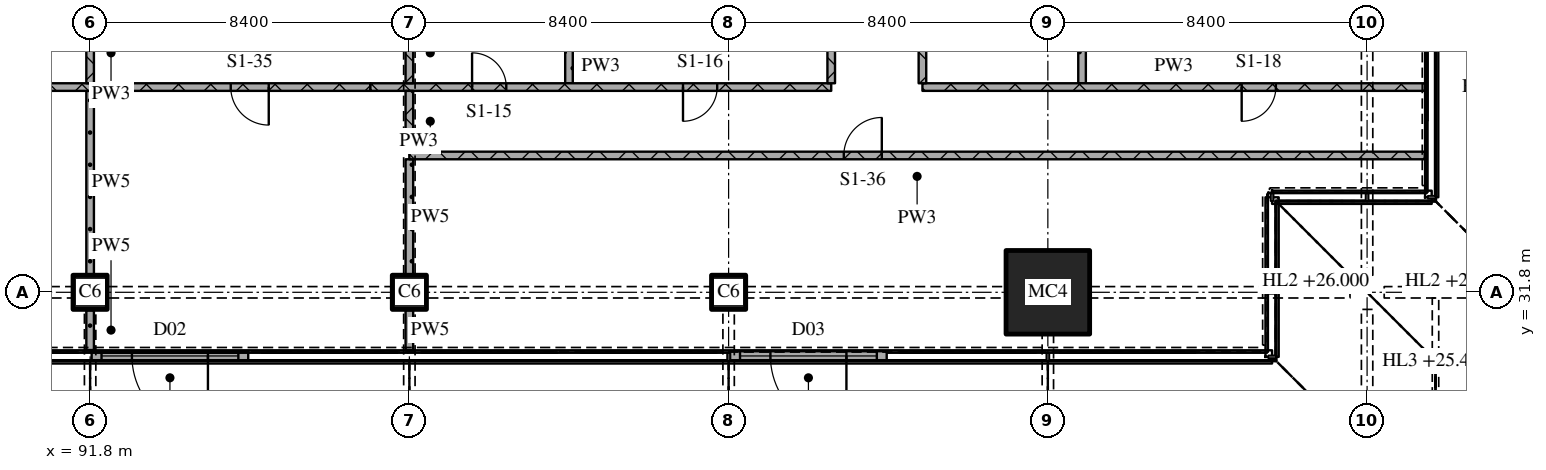
"""IFC4 building model, lengths in metres.
Left out: names, types, materials, properties, quantities, classifications, styles, units other than length and angle.
Written with IfcOpenShell. Run it as: python <this file> out.ifc"""

import sys

from ifc_helpers import new_model, si_unit, direction, frame, frame_2d, origin, origin_2d, place, context, subcontext, project, spatial, rectangle, extrude, element, fill, save


model = new_model("IFC4")
c1 = context("Model", 3, precision=1e-05, world=origin(), true_north=direction((0.0, 1.0)))
c2 = subcontext(c1, "Body", "Model", "MODEL_VIEW")
j1 = project(units=[si_unit("LENGTHUNIT", "METRE"), si_unit("PLANEANGLEUNIT", "RADIAN")], contexts=[c1])
p1 = place(None, origin())
s1 = spatial("IfcSite", under=j1, at=p1, CompositionType="ELEMENT")
p2 = place(p1, origin())
s2 = spatial("IfcBuilding", under=s1, at=p2, CompositionType="ELEMENT")
p3 = place(p2, frame((0.0, 0.0, 19.2)))
s3 = spatial("IfcBuildingStorey", under=s2, at=p3, CompositionType="ELEMENT", Elevation=19.2)
for number, where, z_axis, x_axis in (
    (1, (91.8, 31.8, 0.0), (0.0, 0.0, 1.0), (1.0, 0.0, 0.0)),
    (2, (100.2, 31.8, 0.0), (0.0, 0.0, 1.0), (1.0, 0.0, 0.0)),
    (3, (108.6, 31.8, 0.0), (0.0, 0.0, 1.0), (1.0, 0.0, 0.0)),
):
    element("IfcColumn", number, at=place(p3, frame(where, z_axis=z_axis, x_axis=x_axis)), inside=s3, PredefinedType="COLUMN", context=c2, shape_type="SweptSolid", body=[
        extrude(rectangle(XDim=0.9, YDim=0.9, at=origin_2d()), origin(), (0.0, 0.0, 1.0), 4.5),
    ])
p4 = place(p3, frame((117.0, 31.8, 0.0), z_axis=(0.0, 0.0, 1.0), x_axis=(1.0, 0.0, 0.0)))
e4 = element("IfcColumn", 4, at=p4, inside=s3, PredefinedType="COLUMN", context=c2, shape_type="SweptSolid", body=[
    extrude(rectangle(XDim=2.2, YDim=2.2, at=origin_2d()), origin(), (0.0, 0.0, 1.0), 4.5),
])
p5 = place(p3, frame((95.96, 30.125, 0.0), z_axis=(0.0, 0.0, 1.0), x_axis=(-1.0, 0.0, 0.0)))
e5 = element("IfcWall", 5, at=p5, inside=s3, PredefinedType="SOLIDWALL", context=c2, shape_type="SweptSolid", body=[
    extrude(rectangle(XDim=4.12, YDim=0.25, at=frame_2d((2.06, 0.0))), origin(), (0.0, 0.0, 1.0), 4.2),
])
p6 = place(p5, frame((1.06, 0.0, 0.0)))
e6 = element("IfcOpeningElement", 6, at=p6, cuts=e5, PredefinedType="OPENING", context=c2, shape_type="SweptSolid", body=[
    extrude(rectangle(XDim=2.0, YDim=2.4, at=frame_2d((1.0, 1.2))), frame((0.0, 0.135, 0.0), z_axis=(0.0, -1.0, 0.0), x_axis=(1.0, 0.0, 0.0)), (0.0, 0.0, 1.0), 0.27),
])
p7 = place(p5, frame((0.26, 0.0, 2.7)))
e7 = element("IfcOpeningElement", 7, at=p7, cuts=e5, PredefinedType="OPENING", context=c2, shape_type="SweptSolid", body=[
    extrude(rectangle(XDim=3.6, YDim=1.1, at=frame_2d((1.8, 0.55))), frame((0.0, 0.135, 0.0), z_axis=(0.0, -1.0, 0.0), x_axis=(1.0, 0.0, 0.0)), (0.0, 0.0, 1.0), 0.27),
])
p8 = place(p3, frame((112.76, 30.125, 0.0), z_axis=(0.0, 0.0, 1.0), x_axis=(-1.0, 0.0, 0.0)))
e8 = element("IfcWall", 8, at=p8, inside=s3, PredefinedType="SOLIDWALL", context=c2, shape_type="SweptSolid", body=[
    extrude(rectangle(XDim=4.12, YDim=0.25, at=frame_2d((2.06, 0.0))), origin(), (0.0, 0.0, 1.0), 4.2),
])
p9 = place(p8, frame((1.06, 0.0, 0.0)))
e9 = element("IfcOpeningElement", 9, at=p9, cuts=e8, PredefinedType="OPENING", context=c2, shape_type="SweptSolid", body=[
    extrude(rectangle(XDim=2.0, YDim=2.4, at=frame_2d((1.0, 1.2))), frame((0.0, 0.135, 0.0), z_axis=(0.0, -1.0, 0.0), x_axis=(1.0, 0.0, 0.0)), (0.0, 0.0, 1.0), 0.27),
])
p10 = place(p8, frame((0.26, 0.0, 2.7)))
e10 = element("IfcOpeningElement", 10, at=p10, cuts=e8, PredefinedType="OPENING", context=c2, shape_type="SweptSolid", body=[
    extrude(rectangle(XDim=3.6, YDim=1.1, at=frame_2d((1.8, 0.55))), frame((0.0, 0.135, 0.0), z_axis=(0.0, -1.0, 0.0), x_axis=(1.0, 0.0, 0.0)), (0.0, 0.0, 1.0), 0.27),
])
p11 = place(p3, frame((126.92, 35.4, 0.0), z_axis=(0.0, 0.0, 1.0), x_axis=(-1.0, 0.0, 0.0)))
e11 = element("IfcWall", 11, at=p11, inside=s3, PredefinedType="PARTITIONING", context=c2, shape_type="SweptSolid", body=[
    extrude(rectangle(XDim=26.72, YDim=0.2, at=frame_2d((13.36, 0.0))), origin(), (0.0, 0.0, 1.0), 4.2),
])
p12 = place(p11, frame((14.289, 0.0, 0.0)))
e12 = element("IfcOpeningElement", 12, at=p12, cuts=e11, PredefinedType="OPENING", context=c2, shape_type="SweptSolid", body=[
    extrude(rectangle(XDim=1.0, YDim=2.1, at=frame_2d((0.5, 1.05))), frame((0.0, 0.11, 0.0), z_axis=(0.0, -1.0, 0.0), x_axis=(1.0, 0.0, 0.0)), (0.0, 0.0, 1.0), 0.22),
])
p13 = place(p3, frame((99.175, 37.2, 0.0), z_axis=(0.0, 0.0, 1.0), x_axis=(-1.0, 0.0, 0.0)))
e13 = element("IfcWall", 13, at=p13, inside=s3, PredefinedType="PARTITIONING", context=c2, shape_type="SweptSolid", body=[
    extrude(rectangle(XDim=23.375, YDim=0.2, at=frame_2d((11.688, 0.0))), origin(), (0.0, 0.0, 1.0), 4.2),
])
p14 = place(p13, frame((2.675, 0.0, 0.0)))
e14 = element("IfcOpeningElement", 14, at=p14, cuts=e13, PredefinedType="OPENING", context=c2, shape_type="SweptSolid", body=[
    extrude(rectangle(XDim=1.0, YDim=2.1, at=frame_2d((0.5, 1.05))), frame((0.0, 0.11, 0.0), z_axis=(0.0, -1.0, 0.0), x_axis=(1.0, 0.0, 0.0)), (0.0, 0.0, 1.0), 0.22),
])
p15 = place(p13, frame((11.075, 0.0, 0.0)))
e15 = element("IfcOpeningElement", 15, at=p15, cuts=e13, PredefinedType="OPENING", context=c2, shape_type="SweptSolid", body=[
    extrude(rectangle(XDim=1.0, YDim=2.1, at=frame_2d((0.5, 1.05))), frame((0.0, 0.11, 0.0), z_axis=(0.0, -1.0, 0.0), x_axis=(1.0, 0.0, 0.0)), (0.0, 0.0, 1.0), 0.22),
])
p16 = place(p13, frame((19.475, 0.0, 0.0)))
e16 = element("IfcOpeningElement", 16, at=p16, cuts=e13, PredefinedType="OPENING", context=c2, shape_type="SweptSolid", body=[
    extrude(rectangle(XDim=1.0, YDim=2.1, at=frame_2d((0.5, 1.05))), frame((0.0, 0.11, 0.0), z_axis=(0.0, -1.0, 0.0), x_axis=(1.0, 0.0, 0.0)), (0.0, 0.0, 1.0), 0.22),
])
p17 = place(p3, frame((99.175, 37.2, 0.0), z_axis=(0.0, 0.0, 1.0), x_axis=(1.0, 0.0, 0.0)))
e17 = element("IfcWall", 17, at=p17, inside=s3, PredefinedType="PARTITIONING", context=c2, shape_type="SweptSolid", body=[
    extrude(rectangle(XDim=12.125, YDim=0.2, at=frame_2d((6.062, 0.0))), origin(), (0.0, 0.0, 1.0), 4.2),
])
p18 = place(p17, frame((2.675, 0.0, 0.0)))
e18 = element("IfcOpeningElement", 18, at=p18, cuts=e17, PredefinedType="OPENING", context=c2, shape_type="SweptSolid", body=[
    extrude(rectangle(XDim=0.9, YDim=2.1, at=frame_2d((0.45, 1.05))), frame((0.0, 0.11, 0.0), z_axis=(0.0, -1.0, 0.0), x_axis=(1.0, 0.0, 0.0)), (0.0, 0.0, 1.0), 0.22),
])
p19 = place(p17, frame((8.225, 0.0, 0.0)))
e19 = element("IfcOpeningElement", 19, at=p19, cuts=e17, PredefinedType="OPENING", context=c2, shape_type="SweptSolid", body=[
    extrude(rectangle(XDim=0.9, YDim=2.1, at=frame_2d((0.45, 1.05))), frame((0.0, 0.11, 0.0), z_axis=(0.0, -1.0, 0.0), x_axis=(1.0, 0.0, 0.0)), (0.0, 0.0, 1.0), 0.22),
])
p20 = place(p3, frame((113.7, 37.2, 0.0), z_axis=(0.0, 0.0, 1.0), x_axis=(1.0, 0.0, 0.0)))
e20 = element("IfcWall", 20, at=p20, inside=s3, PredefinedType="PARTITIONING", context=c2, shape_type="SweptSolid", body=[
    extrude(rectangle(XDim=13.22, YDim=0.2, at=frame_2d((6.61, 0.0))), origin(), (0.0, 0.0, 1.0), 4.2),
])
p21 = place(p20, frame((8.4, 0.0, 0.0)))
e21 = element("IfcOpeningElement", 21, at=p21, cuts=e20, PredefinedType="OPENING", context=c2, shape_type="SweptSolid", body=[
    extrude(rectangle(XDim=0.9, YDim=2.1, at=frame_2d((0.45, 1.05))), frame((0.0, 0.11, 0.0), z_axis=(0.0, -1.0, 0.0), x_axis=(1.0, 0.0, 0.0)), (0.0, 0.0, 1.0), 0.22),
])
p22 = place(p3, frame((91.8, 38.9, 0.0), z_axis=(0.0, 0.0, 1.0), x_axis=(0.0, -1.0, 0.0)))
e22 = element("IfcWall", 22, at=p22, inside=s3, PredefinedType="PARTITIONING", context=c2, shape_type="SweptSolid", body=[
    extrude(rectangle(XDim=1.6, YDim=0.2, at=frame_2d((0.8, 0.0))), origin(), (0.0, 0.0, 1.0), 4.2),
])
p23 = place(p3, frame((91.8, 31.33, 0.0), z_axis=(0.0, 0.0, 1.0), x_axis=(0.0, -1.0, 0.0)))
e23 = element("IfcWall", 23, at=p23, inside=s3, PredefinedType="PARTITIONING", context=c2, shape_type="SweptSolid", body=[
    extrude(rectangle(XDim=1.05, YDim=0.2, at=frame_2d((0.525, 0.0))), origin(), (0.0, 0.0, 1.0), 4.2),
])
p24 = place(p3, frame((91.8, 37.1, 0.0), z_axis=(0.0, 0.0, 1.0), x_axis=(0.0, -1.0, 0.0)))
e24 = element("IfcWall", 24, at=p24, inside=s3, PredefinedType="PARTITIONING", context=c2, shape_type="SweptSolid", body=[
    extrude(rectangle(XDim=4.83, YDim=0.2, at=frame_2d((2.415, 0.0))), origin(), (0.0, 0.0, 1.0), 4.2),
])
p25 = place(p3, frame((100.2, 31.33, 0.0), z_axis=(0.0, 0.0, 1.0), x_axis=(0.0, -1.0, 0.0)))
e25 = element("IfcWall", 25, at=p25, inside=s3, PredefinedType="PARTITIONING", context=c2, shape_type="SweptSolid", body=[
    extrude(rectangle(XDim=1.05, YDim=0.2, at=frame_2d((0.525, 0.0))), origin(), (0.0, 0.0, 1.0), 4.2),
])
p26 = place(p3, frame((100.2, 35.3, 0.0), z_axis=(0.0, 0.0, 1.0), x_axis=(0.0, -1.0, 0.0)))
e26 = element("IfcWall", 26, at=p26, inside=s3, PredefinedType="PARTITIONING", context=c2, shape_type="SweptSolid", body=[
    extrude(rectangle(XDim=3.03, YDim=0.2, at=frame_2d((1.515, 0.0))), origin(), (0.0, 0.0, 1.0), 3.7),
])
for number, where, z_axis, x_axis in (
    (27, (104.4, 40.7, 0.0), (0.0, 0.0, 1.0), (0.0, -1.0, 0.0)),
    (28, (111.3, 40.7, 0.0), (0.0, 0.0, 1.0), (0.0, -1.0, 0.0)),
):
    element("IfcWall", number, at=place(p3, frame(where, z_axis=z_axis, x_axis=x_axis)), inside=s3, PredefinedType="PARTITIONING", context=c2, shape_type="SweptSolid", body=[
        extrude(rectangle(XDim=3.4, YDim=0.2, at=frame_2d((1.7, 0.0))), origin(), (0.0, 0.0, 1.0), 4.2),
    ])
p27 = place(p3, frame((113.7, 40.7, 0.0), z_axis=(0.0, 0.0, 1.0), x_axis=(0.0, -1.0, 0.0)))
e29 = element("IfcWall", 29, at=p27, inside=s3, PredefinedType="PARTITIONING", context=c2, shape_type="SweptSolid", body=[
    extrude(rectangle(XDim=3.4, YDim=0.2, at=frame_2d((1.7, 0.0))), origin(), (0.0, 0.0, 1.0), 4.2),
])
p28 = place(p27, frame((1.25, 0.0, 0.0)))
e30 = element("IfcOpeningElement", 30, at=p28, cuts=e29, PredefinedType="OPENING", context=c2, shape_type="SweptSolid", body=[
    extrude(rectangle(XDim=0.9, YDim=2.1, at=frame_2d((0.45, 1.05))), frame((0.0, 0.11, 0.0), z_axis=(0.0, -1.0, 0.0), x_axis=(1.0, 0.0, 0.0)), (0.0, 0.0, 1.0), 0.22),
])
p29 = place(p3, frame((117.9, 40.7, 0.0), z_axis=(0.0, 0.0, 1.0), x_axis=(0.0, -1.0, 0.0)))
e31 = element("IfcWall", 31, at=p29, inside=s3, PredefinedType="PARTITIONING", context=c2, shape_type="SweptSolid", body=[
    extrude(rectangle(XDim=3.4, YDim=0.2, at=frame_2d((1.7, 0.0))), origin(), (0.0, 0.0, 1.0), 4.2),
])
p30 = place(p3, frame((100.2, 37.1, 0.0), z_axis=(0.0, 0.0, 1.0), x_axis=(0.0, -1.0, 0.0)))
e32 = element("IfcWall", 32, at=p30, inside=s3, PredefinedType="PARTITIONING", context=c2, shape_type="SweptSolid", body=[
    extrude(rectangle(XDim=1.6, YDim=0.2, at=frame_2d((0.8, 0.0))), origin(), (0.0, 0.0, 1.0), 3.7),
])
p31 = place(p3, frame((100.2, 38.9, 0.0), z_axis=(0.0, 0.0, 1.0), x_axis=(0.0, -1.0, 0.0)))
e33 = element("IfcWall", 33, at=p31, inside=s3, PredefinedType="PARTITIONING", context=c2, shape_type="SweptSolid", body=[
    extrude(rectangle(XDim=1.6, YDim=0.2, at=frame_2d((0.8, 0.0))), origin(), (0.0, 0.0, 1.0), 3.7),
])
p32 = place(p6, origin())
e34 = element("IfcDoor", 34, at=p32, inside=s3, OperationType="DOUBLE_DOOR_SINGLE_SWING", PredefinedType="DOOR", context=c2, shape_type="SweptSolid", body=[
    extrude(rectangle(XDim=2.0, YDim=2.4, at=frame_2d((1.0, 1.2))), frame((0.0, 0.025, 0.0), z_axis=(0.0, -1.0, 0.0), x_axis=(1.0, 0.0, 0.0)), (0.0, 0.0, 1.0), 0.05),
])
fill(e6, e34)
p33 = place(p7, origin())
e35 = element("IfcWindow", 35, at=p33, inside=s3, PartitioningType="SINGLE_PANEL", PredefinedType="WINDOW", context=c2, shape_type="SweptSolid", body=[
    extrude(rectangle(XDim=3.6, YDim=1.1, at=frame_2d((1.8, 0.55))), frame((0.0, 0.03, 0.0), z_axis=(0.0, -1.0, 0.0), x_axis=(1.0, 0.0, 0.0)), (0.0, 0.0, 1.0), 0.06),
])
fill(e7, e35)
p34 = place(p9, origin())
e36 = element("IfcDoor", 36, at=p34, inside=s3, OperationType="DOUBLE_DOOR_SINGLE_SWING", PredefinedType="DOOR", context=c2, shape_type="SweptSolid", body=[
    extrude(rectangle(XDim=2.0, YDim=2.4, at=frame_2d((1.0, 1.2))), frame((0.0, 0.025, 0.0), z_axis=(0.0, -1.0, 0.0), x_axis=(1.0, 0.0, 0.0)), (0.0, 0.0, 1.0), 0.05),
])
fill(e9, e36)
p35 = place(p10, origin())
e37 = element("IfcWindow", 37, at=p35, inside=s3, PartitioningType="SINGLE_PANEL", PredefinedType="WINDOW", context=c2, shape_type="SweptSolid", body=[
    extrude(rectangle(XDim=3.6, YDim=1.1, at=frame_2d((1.8, 0.55))), frame((0.0, 0.03, 0.0), z_axis=(0.0, -1.0, 0.0), x_axis=(1.0, 0.0, 0.0)), (0.0, 0.0, 1.0), 0.06),
])
fill(e10, e37)
p36 = place(p12, origin())
e38 = element("IfcDoor", 38, at=p36, inside=s3, OperationType="SINGLE_SWING_RIGHT", PredefinedType="DOOR", context=c2, shape_type="SweptSolid", body=[
    extrude(rectangle(XDim=1.0, YDim=2.1, at=frame_2d((0.5, 1.05))), frame((0.0, 0.025, 0.0), z_axis=(0.0, -1.0, 0.0), x_axis=(1.0, 0.0, 0.0)), (0.0, 0.0, 1.0), 0.05),
])
fill(e12, e38)
p37 = place(p14, origin())
e39 = element("IfcDoor", 39, at=p37, inside=s3, OperationType="SINGLE_SWING_LEFT", PredefinedType="DOOR", context=c2, shape_type="SweptSolid", body=[
    extrude(rectangle(XDim=1.0, YDim=2.1, at=frame_2d((0.5, 1.05))), frame((0.0, 0.025, 0.0), z_axis=(0.0, -1.0, 0.0), x_axis=(1.0, 0.0, 0.0)), (0.0, 0.0, 1.0), 0.05),
])
fill(e14, e39)
p38 = place(p18, origin())
e40 = element("IfcDoor", 40, at=p38, inside=s3, OperationType="SINGLE_SWING_LEFT", PredefinedType="DOOR", context=c2, shape_type="SweptSolid", body=[
    extrude(rectangle(XDim=0.9, YDim=2.1, at=frame_2d((0.45, 1.05))), frame((0.0, 0.025, 0.0), z_axis=(0.0, -1.0, 0.0), x_axis=(1.0, 0.0, 0.0)), (0.0, 0.0, 1.0), 0.05),
])
fill(e18, e40)
p39 = place(p19, origin())
e41 = element("IfcDoor", 41, at=p39, inside=s3, OperationType="SINGLE_SWING_RIGHT", PredefinedType="DOOR", context=c2, shape_type="SweptSolid", body=[
    extrude(rectangle(XDim=0.9, YDim=2.1, at=frame_2d((0.45, 1.05))), frame((0.0, 0.025, 0.0), z_axis=(0.0, -1.0, 0.0), x_axis=(1.0, 0.0, 0.0)), (0.0, 0.0, 1.0), 0.05),
])
fill(e19, e41)
p40 = place(p21, origin())
e42 = element("IfcDoor", 42, at=p40, inside=s3, OperationType="SINGLE_SWING_RIGHT", PredefinedType="DOOR", context=c2, shape_type="SweptSolid", body=[
    extrude(rectangle(XDim=0.9, YDim=2.1, at=frame_2d((0.45, 1.05))), frame((0.0, 0.025, 0.0), z_axis=(0.0, -1.0, 0.0), x_axis=(1.0, 0.0, 0.0)), (0.0, 0.0, 1.0), 0.05),
])
fill(e21, e42)
save(model, sys.argv[1])
